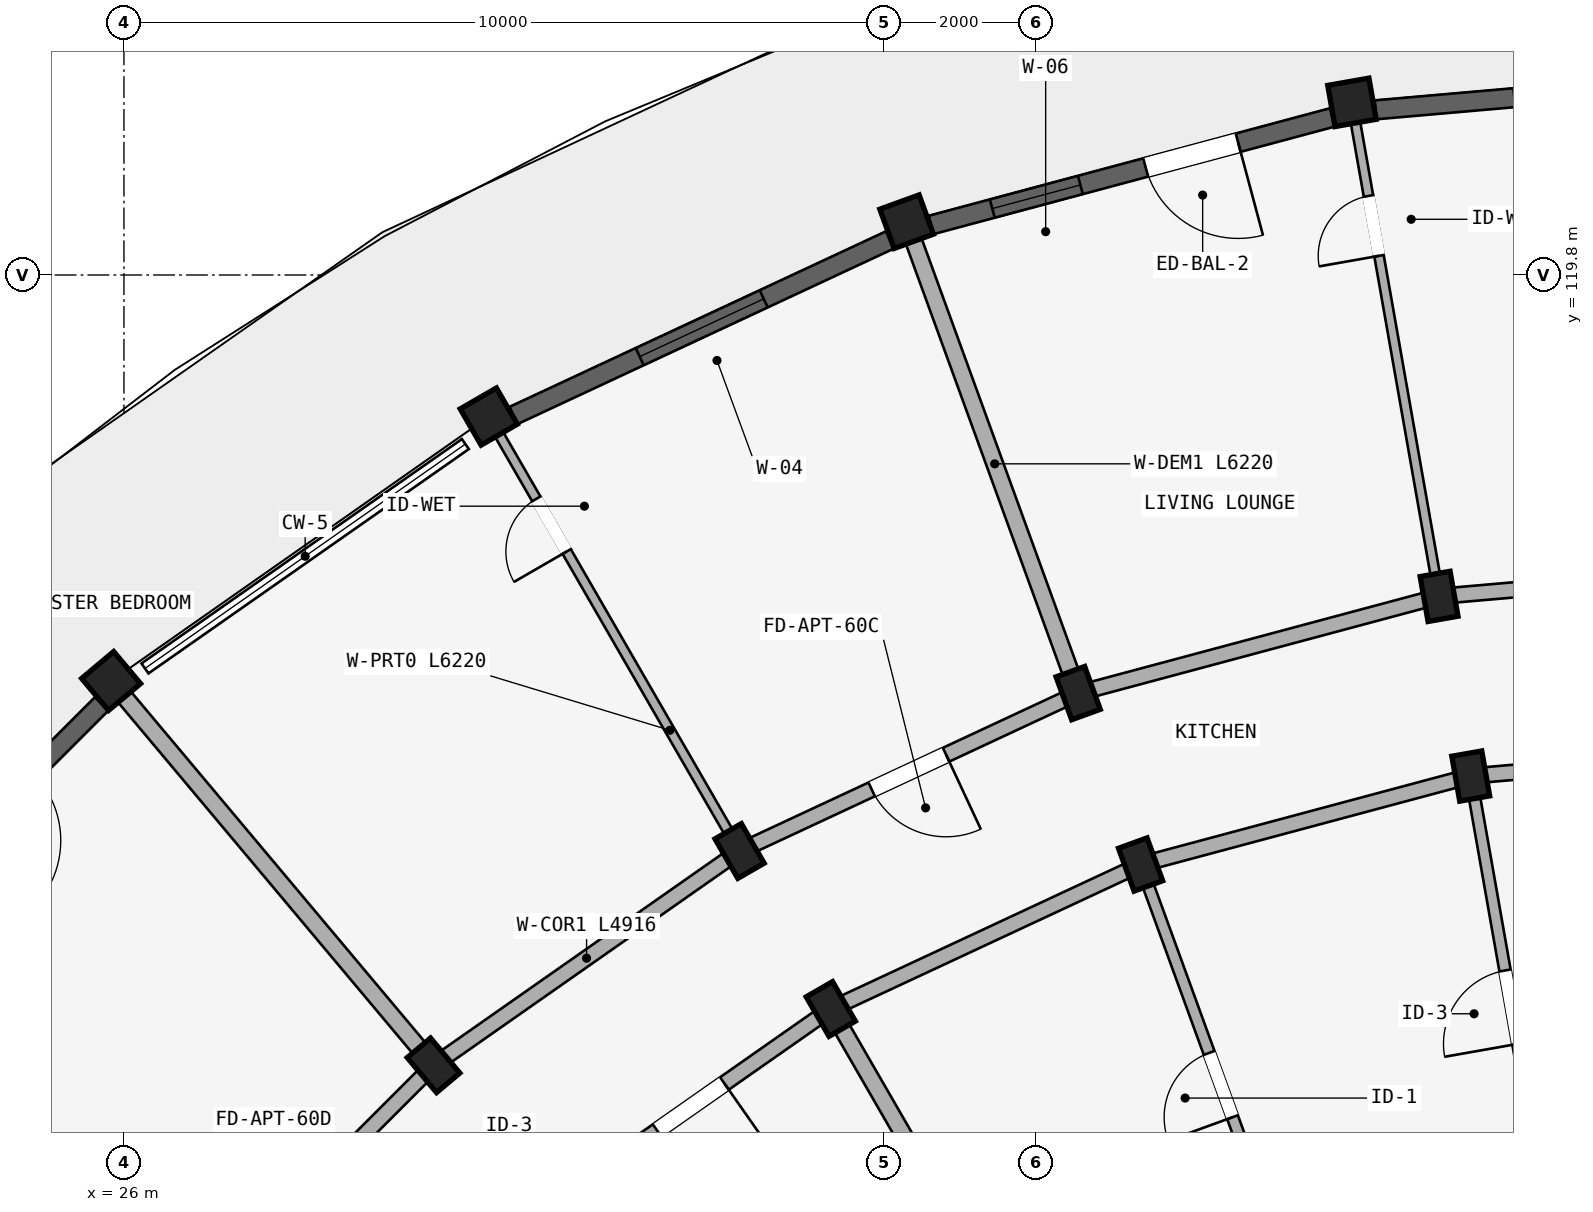
"""IFC4 building model, lengths in metres.
Left out: names, types, materials, properties, quantities, classifications, styles, units other than length and angle.
Written with IfcOpenShell. Run it as: python <this file> out.ifc"""

import sys

from ifc_helpers import new_model, si_unit, direction, frame, frame_2d, origin, origin_2d, place, context, subcontext, project, spatial, rectangle, extrude, element, fill, save


model = new_model("IFC4")
c1 = context("Model", 3, precision=1e-05, world=origin(), true_north=direction((0.0, 1.0)))
c2 = subcontext(c1, "Body", "Model", "MODEL_VIEW")
j1 = project(units=[si_unit("LENGTHUNIT", "METRE"), si_unit("PLANEANGLEUNIT", "RADIAN")], contexts=[c1])
p1 = place(None, origin())
s1 = spatial("IfcSite", under=j1, at=p1, CompositionType="ELEMENT")
p2 = place(p1, origin())
s2 = spatial("IfcBuilding", under=s1, at=p2, CompositionType="ELEMENT")
p3 = place(p2, frame((0.0, 0.0, 49.65)))
s3 = spatial("IfcBuildingStorey", under=s2, at=p3, CompositionType="ELEMENT", Elevation=49.65)
for number, where, z_axis, x_axis in (
    (1, (43.72, 113.208, 0.0), (0.0, 0.0, 1.0), (0.985, 0.174, 0.0)),
    (2, (43.303, 115.572, 0.0), (0.0, 0.0, 1.0), (0.985, 0.174, 0.0)),
):
    element("IfcColumn", number, at=place(p3, frame(where, z_axis=z_axis, x_axis=x_axis)), inside=s3, PredefinedType="COLUMN", context=c2, shape_type="SweptSolid", body=[
        extrude(rectangle(XDim=0.4, YDim=0.6, at=origin_2d()), origin(), (0.0, 0.0, 1.0), 2.91),
    ])
p4 = place(p3, frame((42.157, 122.071, 0.0), z_axis=(0.0, 0.0, 1.0), x_axis=(0.984807753012, 0.173648177667, 0.0)))
e3 = element("IfcColumn", 3, at=p4, inside=s3, PredefinedType="COLUMN", context=c2, shape_type="SweptSolid", body=[
    extrude(rectangle(XDim=0.55, YDim=0.55, at=origin_2d()), origin(), (0.0, 0.0, 1.0), 2.91),
])
for number, where, z_axis, x_axis in (
    (4, (39.376, 112.044, 0.0), (0.0, 0.0, 1.0), (0.94, 0.342, 0.0)),
    (5, (38.555, 114.299, 0.0), (0.0, 0.0, 1.0), (0.94, 0.342, 0.0)),
):
    element("IfcColumn", number, at=place(p3, frame(where, z_axis=z_axis, x_axis=x_axis)), inside=s3, PredefinedType="COLUMN", context=c2, shape_type="SweptSolid", body=[
        extrude(rectangle(XDim=0.4, YDim=0.6, at=origin_2d()), origin(), (0.0, 0.0, 1.0), 2.91),
    ])
p5 = place(p3, frame((36.298, 120.501, 0.0), z_axis=(0.0, 0.0, 1.0), x_axis=(0.939692620786, 0.342020143326, 0.0)))
e6 = element("IfcColumn", 6, at=p5, inside=s3, PredefinedType="COLUMN", context=c2, shape_type="SweptSolid", body=[
    extrude(rectangle(XDim=0.55, YDim=0.55, at=origin_2d()), origin(), (0.0, 0.0, 1.0), 2.91),
])
for number, where, z_axis, x_axis in (
    (7, (35.3, 110.144, 0.0), (0.0, 0.0, 1.0), (0.866, 0.5, 0.0)),
    (8, (34.1, 112.222, 0.0), (0.0, 0.0, 1.0), (0.866, 0.5, 0.0)),
):
    element("IfcColumn", number, at=place(p3, frame(where, z_axis=z_axis, x_axis=x_axis)), inside=s3, PredefinedType="COLUMN", context=c2, shape_type="SweptSolid", body=[
        extrude(rectangle(XDim=0.4, YDim=0.6, at=origin_2d()), origin(), (0.0, 0.0, 1.0), 2.91),
    ])
p6 = place(p3, frame((30.8, 117.938, 0.0), z_axis=(0.0, 0.0, 1.0), x_axis=(0.866025403784, 0.5, 0.0)))
e9 = element("IfcColumn", 9, at=p6, inside=s3, PredefinedType="COLUMN", context=c2, shape_type="SweptSolid", body=[
    extrude(rectangle(XDim=0.55, YDim=0.55, at=origin_2d()), origin(), (0.0, 0.0, 1.0), 2.91),
])
p7 = place(p3, frame((30.073, 109.402, 0.0), z_axis=(0.0, 0.0, 1.0), x_axis=(0.766044443119, 0.642787609687, 0.0)))
e10 = element("IfcColumn", 10, at=p7, inside=s3, PredefinedType="COLUMN", context=c2, shape_type="SweptSolid", body=[
    extrude(rectangle(XDim=0.4, YDim=0.6, at=origin_2d()), origin(), (0.0, 0.0, 1.0), 2.91),
])
p8 = place(p3, frame((25.831, 114.458, 0.0), z_axis=(0.0, 0.0, 1.0), x_axis=(0.766044443119, 0.642787609687, 0.0)))
e11 = element("IfcColumn", 11, at=p8, inside=s3, PredefinedType="COLUMN", context=c2, shape_type="SweptSolid", body=[
    extrude(rectangle(XDim=0.55, YDim=0.55, at=origin_2d()), origin(), (0.0, 0.0, 1.0), 2.91),
])
p9 = place(p3, frame((48.2, 113.6, 0.0), z_axis=(0.0, 0.0, 1.0), x_axis=(-0.996191949488, -0.087187153726, 0.0)))
e12 = element("IfcWall", 12, at=p9, inside=s3, PredefinedType="STANDARD", context=c2, shape_type="SweptSolid", body=[
    extrude(rectangle(XDim=4.497, YDim=0.2, at=frame_2d((2.249, 0.0))), origin(), (0.0, 0.0, 1.0), 2.352),
])
p10 = place(p9, frame((1.729, 0.0, 0.0)))
e13 = element("IfcOpeningElement", 13, at=p10, cuts=e12, PredefinedType="OPENING", context=c2, shape_type="SweptSolid", body=[
    extrude(rectangle(XDim=1.04, YDim=2.15, at=frame_2d((0.52, 1.075))), frame((0.0, 0.11, 0.0), z_axis=(0.0, -1.0, 0.0), x_axis=(1.0, 0.0, 0.0)), (0.0, 0.0, 1.0), 0.22),
])
p11 = place(p3, frame((48.2, 116.0, 0.0), z_axis=(0.0, 0.0, 1.0), x_axis=(-0.996193663584, -0.087167566415, 0.0)))
e14 = element("IfcWall", 14, at=p11, inside=s3, PredefinedType="STANDARD", context=c2, shape_type="SweptSolid", body=[
    extrude(rectangle(XDim=4.916, YDim=0.2, at=frame_2d((2.458, 0.0))), origin(), (0.0, 0.0, 1.0), 2.352),
])
p12 = place(p11, frame((1.938, 0.0, 0.0)))
e15 = element("IfcOpeningElement", 15, at=p12, cuts=e14, PredefinedType="OPENING", context=c2, shape_type="SweptSolid", body=[
    extrude(rectangle(XDim=1.04, YDim=2.15, at=frame_2d((0.52, 1.075))), frame((0.0, 0.11, 0.0), z_axis=(0.0, -1.0, 0.0), x_axis=(1.0, 0.0, 0.0)), (0.0, 0.0, 1.0), 0.22),
])
p13 = place(p3, frame((43.72, 113.208, 0.0), z_axis=(0.0, 0.0, 1.0), x_axis=(-0.965934240054, -0.258787642463, 0.0)))
e16 = element("IfcWall", 16, at=p13, inside=s3, PredefinedType="STANDARD", context=c2, shape_type="SweptSolid", body=[
    extrude(rectangle(XDim=4.497, YDim=0.2, at=frame_2d((2.249, 0.0))), origin(), (0.0, 0.0, 1.0), 2.352),
])
p14 = place(p3, frame((43.303, 115.572, 0.0), z_axis=(0.0, 0.0, 1.0), x_axis=(-0.965930095386, -0.258803112091, 0.0)))
e17 = element("IfcWall", 17, at=p14, inside=s3, PredefinedType="STANDARD", context=c2, shape_type="SweptSolid", body=[
    extrude(rectangle(XDim=4.916, YDim=0.2, at=frame_2d((2.458, 0.0))), origin(), (0.0, 0.0, 1.0), 2.352),
])
p15 = place(p3, frame((39.376, 112.044, 0.0), z_axis=(0.0, 0.0, 1.0), x_axis=(-0.906307919131, -0.422617978463, 0.0)))
e18 = element("IfcWall", 18, at=p15, inside=s3, PredefinedType="STANDARD", context=c2, shape_type="SweptSolid", body=[
    extrude(rectangle(XDim=4.497, YDim=0.2, at=frame_2d((2.249, 0.0))), origin(), (0.0, 0.0, 1.0), 2.352),
])
p16 = place(p3, frame((38.555, 114.299, 0.0), z_axis=(0.0, 0.0, 1.0), x_axis=(-0.906302381024, -0.422629854778, 0.0)))
e19 = element("IfcWall", 19, at=p16, inside=s3, PredefinedType="STANDARD", context=c2, shape_type="SweptSolid", body=[
    extrude(rectangle(XDim=4.915, YDim=0.2, at=frame_2d((2.458, 0.0))), origin(), (0.0, 0.0, 1.0), 2.352),
])
p17 = place(p16, frame((1.918, 0.0, 0.0)))
e20 = element("IfcOpeningElement", 20, at=p17, cuts=e19, PredefinedType="OPENING", context=c2, shape_type="SweptSolid", body=[
    extrude(rectangle(XDim=1.08, YDim=2.15, at=frame_2d((0.54, 1.075))), frame((0.0, 0.11, 0.0), z_axis=(0.0, -1.0, 0.0), x_axis=(1.0, 0.0, 0.0)), (0.0, 0.0, 1.0), 0.22),
])
p18 = place(p3, frame((35.3, 110.144, 0.0), z_axis=(0.0, 0.0, 1.0), x_axis=(-0.819155404658, -0.573571637217, 0.0)))
e21 = element("IfcWall", 21, at=p18, inside=s3, PredefinedType="STANDARD", context=c2, shape_type="SweptSolid", body=[
    extrude(rectangle(XDim=4.497, YDim=0.2, at=frame_2d((2.249, 0.0))), origin(), (0.0, 0.0, 1.0), 2.352),
])
p19 = place(p18, frame((1.709, 0.0, 0.0)))
e22 = element("IfcOpeningElement", 22, at=p19, cuts=e21, PredefinedType="OPENING", context=c2, shape_type="SweptSolid", body=[
    extrude(rectangle(XDim=1.08, YDim=2.15, at=frame_2d((0.54, 1.075))), frame((0.0, 0.11, 0.0), z_axis=(0.0, -1.0, 0.0), x_axis=(1.0, 0.0, 0.0)), (0.0, 0.0, 1.0), 0.22),
])
p20 = place(p3, frame((34.1, 112.222, 0.0), z_axis=(0.0, 0.0, 1.0), x_axis=(-0.819140911474, -0.573592335331, 0.0)))
e23 = element("IfcWall", 23, at=p20, inside=s3, PredefinedType="STANDARD", context=c2, shape_type="SweptSolid", body=[
    extrude(rectangle(XDim=4.916, YDim=0.2, at=frame_2d((2.458, 0.0))), origin(), (0.0, 0.0, 1.0), 2.352),
])
p21 = place(p3, frame((30.073, 109.402, 0.0), z_axis=(0.0, 0.0, 1.0), x_axis=(-0.707106781187, -0.707106781187, 0.0)))
e24 = element("IfcWall", 24, at=p21, inside=s3, PredefinedType="STANDARD", context=c2, shape_type="SweptSolid", body=[
    extrude(rectangle(XDim=4.916, YDim=0.2, at=frame_2d((2.458, 0.0))), origin(), (0.0, 0.0, 1.0), 2.352),
])
p22 = place(p21, frame((1.888, 0.0, 0.0)))
e25 = element("IfcOpeningElement", 25, at=p22, cuts=e24, PredefinedType="OPENING", context=c2, shape_type="SweptSolid", body=[
    extrude(rectangle(XDim=1.14, YDim=2.15, at=frame_2d((0.57, 1.075))), frame((0.0, 0.11, 0.0), z_axis=(0.0, -1.0, 0.0), x_axis=(1.0, 0.0, 0.0)), (0.0, 0.0, 1.0), 0.22),
])
p23 = place(p3, frame((44.901, 106.511, 0.0), z_axis=(0.0, 0.0, 1.0), x_axis=(-0.173647089161, 0.984807944945, 0.0)))
e26 = element("IfcWall", 26, at=p23, inside=s3, PredefinedType="PARTITIONING", context=c2, shape_type="SweptSolid", body=[
    extrude(rectangle(XDim=6.75, YDim=0.15, at=frame_2d((3.375, 0.0))), origin(), (0.0, 0.0, 1.0), 2.352),
])
p24 = place(p23, frame((3.222, 0.0, 0.0)))
e27 = element("IfcOpeningElement", 27, at=p24, cuts=e26, PredefinedType="OPENING", context=c2, shape_type="SweptSolid", body=[
    extrude(rectangle(XDim=0.98, YDim=2.12, at=frame_2d((0.49, 1.06))), frame((0.0, 0.085, 0.0), z_axis=(0.0, -1.0, 0.0), x_axis=(1.0, 0.0, 0.0)), (0.0, 0.0, 1.0), 0.17),
])
p25 = place(p3, frame((43.286, 115.67, 0.0), z_axis=(0.0, 0.0, 1.0), x_axis=(-0.173646504755, 0.98480804799, 0.0)))
e28 = element("IfcWall", 28, at=p25, inside=s3, PredefinedType="PARTITIONING", context=c2, shape_type="SweptSolid", body=[
    extrude(rectangle(XDim=6.22, YDim=0.125, at=frame_2d((3.11, 0.0))), origin(), (0.0, 0.0, 1.0), 2.352),
])
p26 = place(p25, frame((4.45, 0.0, 0.0)))
e29 = element("IfcOpeningElement", 29, at=p26, cuts=e28, PredefinedType="OPENING", context=c2, shape_type="SweptSolid", body=[
    extrude(rectangle(XDim=0.8, YDim=2.1, at=frame_2d((0.4, 1.05))), frame((0.0, 0.073, 0.0), z_axis=(0.0, -1.0, 0.0), x_axis=(1.0, 0.0, 0.0)), (0.0, 0.0, 1.0), 0.145),
])
p27 = place(p3, frame((41.702, 105.654, 0.0), z_axis=(0.0, 0.0, 1.0), x_axis=(-0.342010221662, 0.939696231917, 0.0)))
e30 = element("IfcWall", 30, at=p27, inside=s3, PredefinedType="PARTITIONING", context=c2, shape_type="SweptSolid", body=[
    extrude(rectangle(XDim=6.75, YDim=0.15, at=frame_2d((3.375, 0.0))), origin(), (0.0, 0.0, 1.0), 2.352),
])
p28 = place(p27, frame((3.262, 0.0, 0.0)))
e31 = element("IfcOpeningElement", 31, at=p28, cuts=e30, PredefinedType="OPENING", context=c2, shape_type="SweptSolid", body=[
    extrude(rectangle(XDim=0.9, YDim=2.1, at=frame_2d((0.45, 1.05))), frame((0.0, 0.085, 0.0), z_axis=(0.0, -1.0, 0.0), x_axis=(1.0, 0.0, 0.0)), (0.0, 0.0, 1.0), 0.17),
])
p29 = place(p3, frame((38.521, 114.393, 0.0), z_axis=(0.0, 0.0, 1.0), x_axis=(-0.341992021352, 0.939702855871, 0.0)))
e32 = element("IfcWall", 32, at=p29, inside=s3, PredefinedType="STANDARD", context=c2, shape_type="SweptSolid", body=[
    extrude(rectangle(XDim=6.22, YDim=0.22, at=frame_2d((3.11, 0.0))), origin(), (0.0, 0.0, 1.0), 2.352),
])
p30 = place(p3, frame((38.7, 104.254, 0.0), z_axis=(0.0, 0.0, 1.0), x_axis=(-0.499997969693, 0.866026575979, 0.0)))
e33 = element("IfcWall", 33, at=p30, inside=s3, PredefinedType="STANDARD", context=c2, shape_type="SweptSolid", body=[
    extrude(rectangle(XDim=6.75, YDim=0.22, at=frame_2d((3.375, 0.0))), origin(), (0.0, 0.0, 1.0), 2.352),
])
p31 = place(p3, frame((34.05, 112.309, 0.0), z_axis=(0.0, 0.0, 1.0), x_axis=(-0.500010116563, 0.866019562905, 0.0)))
e34 = element("IfcWall", 34, at=p31, inside=s3, PredefinedType="PARTITIONING", context=c2, shape_type="SweptSolid", body=[
    extrude(rectangle(XDim=6.22, YDim=0.125, at=frame_2d((3.11, 0.0))), origin(), (0.0, 0.0, 1.0), 2.352),
])
p32 = place(p31, frame((4.45, 0.0, 0.0)))
e35 = element("IfcOpeningElement", 35, at=p32, cuts=e34, PredefinedType="OPENING", context=c2, shape_type="SweptSolid", body=[
    extrude(rectangle(XDim=0.8, YDim=2.1, at=frame_2d((0.4, 1.05))), frame((0.0, 0.073, 0.0), z_axis=(0.0, -1.0, 0.0), x_axis=(1.0, 0.0, 0.0)), (0.0, 0.0, 1.0), 0.145),
])
p33 = place(p3, frame((30.009, 109.479, 0.0), z_axis=(0.0, 0.0, 1.0), x_axis=(-0.642771313427, 0.766058117009, 0.0)))
e36 = element("IfcWall", 36, at=p33, inside=s3, PredefinedType="STANDARD", context=c2, shape_type="SweptSolid", body=[
    extrude(rectangle(XDim=6.22, YDim=0.22, at=frame_2d((3.11, 0.0))), origin(), (0.0, 0.0, 1.0), 2.352),
])
p34 = place(p3, frame((26.521, 105.991, 0.0), z_axis=(0.0, 0.0, 1.0), x_axis=(-0.766058117009, 0.642771313427, 0.0)))
e37 = element("IfcWall", 37, at=p34, inside=s3, PredefinedType="PARTITIONING", context=c2, shape_type="SweptSolid", body=[
    extrude(rectangle(XDim=6.22, YDim=0.125, at=frame_2d((3.11, 0.0))), origin(), (0.0, 0.0, 1.0), 2.352),
])
p35 = place(p34, frame((4.45, 0.0, 0.0)))
e38 = element("IfcOpeningElement", 38, at=p35, cuts=e37, PredefinedType="OPENING", context=c2, shape_type="SweptSolid", body=[
    extrude(rectangle(XDim=0.8, YDim=2.1, at=frame_2d((0.4, 1.05))), frame((0.0, 0.073, 0.0), z_axis=(0.0, -1.0, 0.0), x_axis=(1.0, 0.0, 0.0)), (0.0, 0.0, 1.0), 0.145),
])
p36 = place(p3, frame((48.066, 122.463, 0.0), z_axis=(0.0, 0.0, 1.0), x_axis=(-0.996192680155, -0.087178804791, 0.0)))
e39 = element("IfcWall", 39, at=p36, inside=s3, PredefinedType="STANDARD", context=c2, shape_type="SweptSolid", body=[
    extrude(rectangle(XDim=5.621, YDim=0.25, at=frame_2d((2.81, 0.0))), origin(), (0.0, 0.0, 1.0), 2.352),
])
p37 = place(p36, frame((1.988, 0.0, 0.502)))
e40 = element("IfcOpeningElement", 40, at=p37, cuts=e39, PredefinedType="OPENING", context=c2, shape_type="SweptSolid", body=[
    extrude(rectangle(XDim=1.8, YDim=1.65, at=frame_2d((0.9, 0.825))), frame((0.0, 0.135, 0.0), z_axis=(0.0, -1.0, 0.0), x_axis=(1.0, 0.0, 0.0)), (0.0, 0.0, 1.0), 0.27),
])
p38 = place(p3, frame((41.899, 121.873, 0.0), z_axis=(0.0, 0.0, 1.0), x_axis=(-0.965921330231, -0.258835824038, 0.0)))
e41 = element("IfcWall", 41, at=p38, inside=s3, PredefinedType="STANDARD", context=c2, shape_type="SweptSolid", body=[
    extrude(rectangle(XDim=5.465, YDim=0.25, at=frame_2d((2.732, 0.0))), origin(), (0.0, 0.0, 1.0), 2.352),
])
p39 = place(p38, frame((3.432, 0.0, 0.402)))
e42 = element("IfcOpeningElement", 42, at=p39, cuts=e41, PredefinedType="OPENING", context=c2, shape_type="SweptSolid", body=[
    extrude(rectangle(XDim=1.2, YDim=1.5, at=frame_2d((0.6, 0.75))), frame((0.0, 0.135, 0.0), z_axis=(0.0, -1.0, 0.0), x_axis=(1.0, 0.0, 0.0)), (0.0, 0.0, 1.0), 0.27),
])
p40 = place(p38, frame((1.283, 0.0, 0.0)))
e43 = element("IfcOpeningElement", 43, at=p40, cuts=e41, PredefinedType="OPENING", context=c2, shape_type="SweptSolid", body=[
    extrude(rectangle(XDim=1.26, YDim=2.15, at=frame_2d((0.63, 1.075))), frame((0.0, 0.135, 0.0), z_axis=(0.0, -1.0, 0.0), x_axis=(1.0, 0.0, 0.0)), (0.0, 0.0, 1.0), 0.27),
])
p41 = place(p3, frame((36.078, 120.261, 0.0), z_axis=(0.0, 0.0, 1.0), x_axis=(-0.906307504033, -0.422618868643, 0.0)))
e44 = element("IfcWall", 44, at=p41, inside=s3, PredefinedType="STANDARD", context=c2, shape_type="SweptSolid", body=[
    extrude(rectangle(XDim=5.465, YDim=0.25, at=frame_2d((2.732, 0.0))), origin(), (0.0, 0.0, 1.0), 2.352),
])
p42 = place(p41, frame((1.833, 0.0, 0.502)))
e45 = element("IfcOpeningElement", 45, at=p42, cuts=e44, PredefinedType="OPENING", context=c2, shape_type="SweptSolid", body=[
    extrude(rectangle(XDim=1.8, YDim=1.65, at=frame_2d((0.9, 0.825))), frame((0.0, 0.135, 0.0), z_axis=(0.0, -1.0, 0.0), x_axis=(1.0, 0.0, 0.0)), (0.0, 0.0, 1.0), 0.27),
])
p43 = place(p3, frame((25.707, 114.157, 0.0), z_axis=(0.0, 0.0, 1.0), x_axis=(-0.707106781187, -0.707106781187, 0.0)))
e46 = element("IfcWall", 46, at=p43, inside=s3, PredefinedType="STANDARD", context=c2, shape_type="SweptSolid", body=[
    extrude(rectangle(XDim=5.465, YDim=0.25, at=frame_2d((2.732, 0.0))), origin(), (0.0, 0.0, 1.0), 2.352),
])
p44 = place(p43, frame((3.432, 0.0, 0.402)))
e47 = element("IfcOpeningElement", 47, at=p44, cuts=e46, PredefinedType="OPENING", context=c2, shape_type="SweptSolid", body=[
    extrude(rectangle(XDim=1.2, YDim=1.5, at=frame_2d((0.6, 0.75))), frame((0.0, 0.135, 0.0), z_axis=(0.0, -1.0, 0.0), x_axis=(1.0, 0.0, 0.0)), (0.0, 0.0, 1.0), 0.27),
])
p45 = place(p43, frame((1.283, 0.0, 0.0)))
e48 = element("IfcOpeningElement", 48, at=p45, cuts=e46, PredefinedType="OPENING", context=c2, shape_type="SweptSolid", body=[
    extrude(rectangle(XDim=1.26, YDim=2.15, at=frame_2d((0.63, 1.075))), frame((0.0, 0.135, 0.0), z_axis=(0.0, -1.0, 0.0), x_axis=(1.0, 0.0, 0.0)), (0.0, 0.0, 1.0), 0.27),
])
p46 = place(p39, origin())
e49 = element("IfcWindow", 49, at=p46, inside=s3, PartitioningType="SINGLE_PANEL", PredefinedType="WINDOW", context=c2, shape_type="SweptSolid", body=[
    extrude(rectangle(XDim=1.2, YDim=1.5, at=frame_2d((0.6, 0.75))), frame((0.0, 0.03, 0.0), z_axis=(0.0, -1.0, 0.0), x_axis=(1.0, 0.0, 0.0)), (0.0, 0.0, 1.0), 0.06),
])
fill(e42, e49)
p47 = place(p42, origin())
e50 = element("IfcWindow", 50, at=p47, inside=s3, PartitioningType="DOUBLE_PANEL_VERTICAL", PredefinedType="WINDOW", context=c2, shape_type="SweptSolid", body=[
    extrude(rectangle(XDim=1.8, YDim=1.65, at=frame_2d((0.9, 0.825))), frame((0.0, 0.03, 0.0), z_axis=(0.0, -1.0, 0.0), x_axis=(1.0, 0.0, 0.0)), (0.0, 0.0, 1.0), 0.06),
])
fill(e45, e50)
p48 = place(p24, frame((0.98, 0.0, 0.0), z_axis=(0.0, 0.0, 1.0), x_axis=(-1.0, 0.0, 0.0)))
e51 = element("IfcDoor", 51, at=p48, inside=s3, OperationType="SINGLE_SWING_RIGHT", PredefinedType="DOOR", context=c2, shape_type="SweptSolid", body=[
    extrude(rectangle(XDim=0.98, YDim=2.12, at=frame_2d((0.49, 1.06))), frame((0.0, 0.025, 0.0), z_axis=(0.0, -1.0, 0.0), x_axis=(1.0, 0.0, 0.0)), (0.0, 0.0, 1.0), 0.05),
])
fill(e27, e51)
p49 = place(p26, origin())
e52 = element("IfcDoor", 52, at=p49, inside=s3, OperationType="SINGLE_SWING_LEFT", PredefinedType="DOOR", context=c2, shape_type="SweptSolid", body=[
    extrude(rectangle(XDim=0.8, YDim=2.1, at=frame_2d((0.4, 1.05))), frame((0.0, 0.025, 0.0), z_axis=(0.0, -1.0, 0.0), x_axis=(1.0, 0.0, 0.0)), (0.0, 0.0, 1.0), 0.05),
])
fill(e29, e52)
p50 = place(p28, frame((0.9, 0.0, 0.0), z_axis=(0.0, 0.0, 1.0), x_axis=(-1.0, 0.0, 0.0)))
e53 = element("IfcDoor", 53, at=p50, inside=s3, OperationType="SINGLE_SWING_RIGHT", PredefinedType="DOOR", context=c2, shape_type="SweptSolid", body=[
    extrude(rectangle(XDim=0.9, YDim=2.1, at=frame_2d((0.45, 1.05))), frame((0.0, 0.025, 0.0), z_axis=(0.0, -1.0, 0.0), x_axis=(1.0, 0.0, 0.0)), (0.0, 0.0, 1.0), 0.05),
])
fill(e31, e53)
p51 = place(p32, origin())
e54 = element("IfcDoor", 54, at=p51, inside=s3, OperationType="SINGLE_SWING_LEFT", PredefinedType="DOOR", context=c2, shape_type="SweptSolid", body=[
    extrude(rectangle(XDim=0.8, YDim=2.1, at=frame_2d((0.4, 1.05))), frame((0.0, 0.025, 0.0), z_axis=(0.0, -1.0, 0.0), x_axis=(1.0, 0.0, 0.0)), (0.0, 0.0, 1.0), 0.05),
])
fill(e35, e54)
p52 = place(p17, frame((1.08, 0.0, 0.0), z_axis=(0.0, 0.0, 1.0), x_axis=(-1.0, 0.0, 0.0)))
e55 = element("IfcDoor", 55, at=p52, inside=s3, OperationType="SINGLE_SWING_RIGHT", PredefinedType="DOOR", context=c2, shape_type="SweptSolid", body=[
    extrude(rectangle(XDim=1.08, YDim=2.15, at=frame_2d((0.54, 1.075))), frame((0.0, 0.025, 0.0), z_axis=(0.0, -1.0, 0.0), x_axis=(1.0, 0.0, 0.0)), (0.0, 0.0, 1.0), 0.05),
])
fill(e20, e55)
p53 = place(p19, frame((1.08, 0.0, 0.0), z_axis=(0.0, 0.0, 1.0), x_axis=(-1.0, 0.0, 0.0)))
e56 = element("IfcDoor", 56, at=p53, inside=s3, OperationType="SINGLE_SWING_RIGHT", PredefinedType="DOOR", context=c2, shape_type="SweptSolid", body=[
    extrude(rectangle(XDim=1.08, YDim=2.15, at=frame_2d((0.54, 1.075))), frame((0.0, 0.025, 0.0), z_axis=(0.0, -1.0, 0.0), x_axis=(1.0, 0.0, 0.0)), (0.0, 0.0, 1.0), 0.05),
])
fill(e22, e56)
p54 = place(p40, frame((1.26, 0.0, 0.0), z_axis=(0.0, 0.0, 1.0), x_axis=(-1.0, 0.0, 0.0)))
e57 = element("IfcDoor", 57, at=p54, inside=s3, OperationType="SINGLE_SWING_RIGHT", PredefinedType="DOOR", context=c2, shape_type="SweptSolid", body=[
    extrude(rectangle(XDim=1.26, YDim=2.15, at=frame_2d((0.63, 1.075))), frame((0.0, 0.025, 0.0), z_axis=(0.0, -1.0, 0.0), x_axis=(1.0, 0.0, 0.0)), (0.0, 0.0, 1.0), 0.05),
])
fill(e43, e57)
save(model, sys.argv[1])
